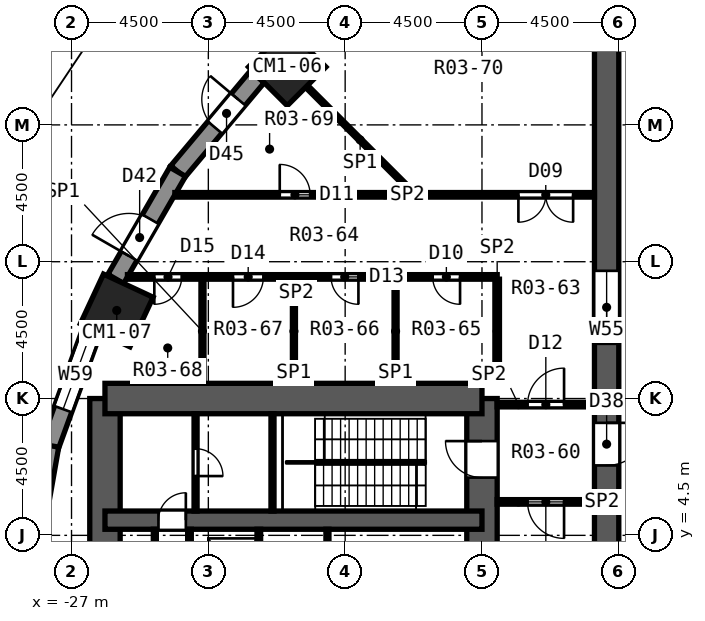
"""IFC4 building model, lengths in metres.
Left out: names, types, materials, properties, quantities, classifications, styles, units other than length and angle.
Written with IfcOpenShell. Run it as: python <this file> out.ifc"""

import sys

from ifc_helpers import new_model, si_unit, direction, frame, frame_2d, origin, origin_2d, place, context, subcontext, project, spatial, rectangle, extrude, element, fill, save


model = new_model("IFC4")
c1 = context("Model", 3, precision=1e-05, world=origin(), true_north=direction((0.0, 1.0)))
c2 = subcontext(c1, "Body", "Model", "MODEL_VIEW")
j1 = project(units=[si_unit("LENGTHUNIT", "METRE"), si_unit("PLANEANGLEUNIT", "RADIAN")], contexts=[c1])
p1 = place(None, origin())
s1 = spatial("IfcSite", under=j1, at=p1, CompositionType="ELEMENT")
p2 = place(p1, origin())
s2 = spatial("IfcBuilding", under=s1, at=p2, CompositionType="ELEMENT")
p3 = place(p2, origin())
s3 = spatial("IfcBuildingStorey", under=s2, at=p3, CompositionType="ELEMENT", Elevation=0.0)
for number, where, z_axis, x_axis in (
    (1, (-19.905, 19.905, 0.0), (0.0, 0.0, 1.0), (-0.707, 0.707, 0.0)),
    (2, (-25.512, 11.897, 0.0), (0.0, 0.0, 1.0), (-0.906, 0.423, 0.0)),
):
    element("IfcColumn", number, at=place(p3, frame(where, z_axis=z_axis, x_axis=x_axis)), inside=s3, PredefinedType="COLUMN", context=c2, shape_type="SweptSolid", body=[
        extrude(rectangle(XDim=1.8, YDim=1.8, at=origin_2d()), origin(), (0.0, 0.0, 1.0), 5.0),
    ])
p4 = place(p3, frame((-13.5, -9.0, 0.0), z_axis=(0.0, 0.0, 1.0), x_axis=(0.0, 1.0, 0.0)))
e3 = element("IfcWall", 3, at=p4, inside=s3, PredefinedType="SHEAR", context=c2, shape_type="SweptSolid", body=[
    extrude(rectangle(XDim=18.0, YDim=1.0, at=frame_2d((9.0, 0.0))), origin(), (0.0, 0.0, 1.0), 5.0),
])
p5 = place(p4, frame((15.4, 0.0, 0.0)))
e4 = element("IfcOpeningElement", 4, at=p5, cuts=e3, PredefinedType="OPENING", context=c2, shape_type="SweptSolid", body=[
    extrude(rectangle(XDim=1.2, YDim=2.1, at=frame_2d((0.6, 1.05))), frame((0.0, 0.512, 0.0), z_axis=(0.0, -1.0, 0.0), x_axis=(1.0, 0.0, 0.0)), (0.0, 0.0, 1.0), 1.024),
])
p6 = place(p4, frame((1.4, 0.0, 0.0)))
e5 = element("IfcOpeningElement", 5, at=p6, cuts=e3, PredefinedType="OPENING", context=c2, shape_type="SweptSolid", body=[
    extrude(rectangle(XDim=1.2, YDim=2.1, at=frame_2d((0.6, 1.05))), frame((0.0, 0.512, 0.0), z_axis=(0.0, -1.0, 0.0), x_axis=(1.0, 0.0, 0.0)), (0.0, 0.0, 1.0), 1.024),
])
p7 = place(p4, frame((7.5, 0.0, 0.0)))
e6 = element("IfcOpeningElement", 6, at=p7, cuts=e3, PredefinedType="OPENING", context=c2, shape_type="SweptSolid", body=[
    extrude(rectangle(XDim=3.0, YDim=2.4, at=frame_2d((1.5, 1.2))), frame((0.0, 0.512, 0.0), z_axis=(0.0, -1.0, 0.0), x_axis=(1.0, 0.0, 0.0)), (0.0, 0.0, 1.0), 1.024),
])
p8 = place(p3, frame((-25.9, -9.0, 0.0), z_axis=(0.0, 0.0, 1.0), x_axis=(0.0, 1.0, 0.0)))
e7 = element("IfcWall", 7, at=p8, inside=s3, PredefinedType="SHEAR", context=c2, shape_type="SweptSolid", body=[
    extrude(rectangle(XDim=18.0, YDim=1.0, at=frame_2d((9.0, 0.0))), origin(), (0.0, 0.0, 1.0), 5.0),
])
p9 = place(p3, frame((-13.5, 9.0, 0.0), z_axis=(0.0, 0.0, 1.0), x_axis=(-1.0, 0.0, 0.0)))
e8 = element("IfcWall", 8, at=p9, inside=s3, PredefinedType="SHEAR", context=c2, shape_type="SweptSolid", body=[
    extrude(rectangle(XDim=12.4, YDim=1.0, at=frame_2d((6.2, 0.0))), origin(), (0.0, 0.0, 1.0), 5.0),
])
p10 = place(p3, frame((-13.5, 5.0, 0.0), z_axis=(0.0, 0.0, 1.0), x_axis=(-1.0, 0.0, 0.0)))
e9 = element("IfcWall", 9, at=p10, inside=s3, PredefinedType="SHEAR", context=c2, shape_type="SweptSolid", body=[
    extrude(rectangle(XDim=12.4, YDim=0.6, at=frame_2d((6.2, 0.0))), origin(), (0.0, 0.0, 1.0), 5.0),
])
p11 = place(p10, frame((9.74, 0.0, 0.0)))
e10 = element("IfcOpeningElement", 10, at=p11, cuts=e9, PredefinedType="OPENING", context=c2, shape_type="SweptSolid", body=[
    extrude(rectangle(XDim=0.9, YDim=2.1, at=frame_2d((0.45, 1.05))), frame((0.0, 0.312, 0.0), z_axis=(0.0, -1.0, 0.0), x_axis=(1.0, 0.0, 0.0)), (0.0, 0.0, 1.0), 0.624),
])
p12 = place(p3, frame((-9.4, -27.077, 0.0), z_axis=(0.0, 0.0, 1.0), x_axis=(0.0, 1.0, 0.0)))
e11 = element("IfcWall", 11, at=p12, inside=s3, PredefinedType="SHEAR", context=c2, shape_type="SweptSolid", body=[
    extrude(rectangle(XDim=54.154, YDim=0.8, at=frame_2d((27.077, 0.0))), origin(), (0.0, 0.0, 1.0), 5.0),
])
p13 = place(p12, frame((17.377, 0.0, 0.0)))
e12 = element("IfcOpeningElement", 12, at=p13, cuts=e11, PredefinedType="OPENING", context=c2, shape_type="SweptSolid", body=[
    extrude(rectangle(XDim=1.4, YDim=2.1, at=frame_2d((0.7, 1.05))), frame((0.0, 0.412, 0.0), z_axis=(0.0, -1.0, 0.0), x_axis=(1.0, 0.0, 0.0)), (0.0, 0.0, 1.0), 0.824),
])
p14 = place(p12, frame((21.777, 0.0, 0.3)))
e13 = element("IfcOpeningElement", 13, at=p14, cuts=e11, PredefinedType="OPENING", context=c2, shape_type="SweptSolid", body=[
    extrude(rectangle(XDim=2.4, YDim=2.1, at=frame_2d((1.2, 1.05))), frame((0.0, 0.412, 0.0), z_axis=(0.0, -1.0, 0.0), x_axis=(1.0, 0.0, 0.0)), (0.0, 0.0, 1.0), 0.824),
])
p15 = place(p12, frame((24.377, 0.0, 0.0)))
e14 = element("IfcOpeningElement", 14, at=p15, cuts=e11, PredefinedType="OPENING", context=c2, shape_type="SweptSolid", body=[
    extrude(rectangle(XDim=1.4, YDim=2.1, at=frame_2d((0.7, 1.05))), frame((0.0, 0.412, 0.0), z_axis=(0.0, -1.0, 0.0), x_axis=(1.0, 0.0, 0.0)), (0.0, 0.0, 1.0), 0.824),
])
p16 = place(p12, frame((28.477, 0.0, 0.3)))
e15 = element("IfcOpeningElement", 15, at=p16, cuts=e11, PredefinedType="OPENING", context=c2, shape_type="SweptSolid", body=[
    extrude(rectangle(XDim=2.4, YDim=2.1, at=frame_2d((1.2, 1.05))), frame((0.0, 0.412, 0.0), z_axis=(0.0, -1.0, 0.0), x_axis=(1.0, 0.0, 0.0)), (0.0, 0.0, 1.0), 0.824),
])
p17 = place(p12, frame((33.877, 0.0, 0.0)))
e16 = element("IfcOpeningElement", 16, at=p17, cuts=e11, PredefinedType="OPENING", context=c2, shape_type="SweptSolid", body=[
    extrude(rectangle(XDim=1.4, YDim=2.1, at=frame_2d((0.7, 1.05))), frame((0.0, 0.412, 0.0), z_axis=(0.0, -1.0, 0.0), x_axis=(1.0, 0.0, 0.0)), (0.0, 0.0, 1.0), 0.824),
])
p18 = place(p12, frame((37.877, 0.0, 0.3)))
e17 = element("IfcOpeningElement", 17, at=p18, cuts=e11, PredefinedType="OPENING", context=c2, shape_type="SweptSolid", body=[
    extrude(rectangle(XDim=2.4, YDim=2.1, at=frame_2d((1.2, 1.05))), frame((0.0, 0.412, 0.0), z_axis=(0.0, -1.0, 0.0), x_axis=(1.0, 0.0, 0.0)), (0.0, 0.0, 1.0), 0.824),
])
p19 = place(p3, frame((-20.891, 19.581, 0.0), z_axis=(0.0, 0.0, 1.0), x_axis=(-0.642800844336, -0.766033337734, 0.0)))
e18 = element("IfcWall", 18, at=p19, inside=s3, PredefinedType="SOLIDWALL", context=c2, shape_type="SweptSolid", body=[
    extrude(rectangle(XDim=4.069, YDim=0.6, at=frame_2d((2.035, 0.0))), origin(), (0.0, 0.0, 1.0), 4.45),
])
p20 = place(p19, frame((0.972, 0.0, 0.0)))
e19 = element("IfcOpeningElement", 19, at=p20, cuts=e18, PredefinedType="OPENING", context=c2, shape_type="SweptSolid", body=[
    extrude(rectangle(XDim=1.2, YDim=2.1, at=frame_2d((0.6, 1.05))), frame((0.0, 0.312, 0.0), z_axis=(0.0, -1.0, 0.0), x_axis=(1.0, 0.0, 0.0)), (0.0, 0.0, 1.0), 0.624),
])
p21 = place(p3, frame((-23.51, 16.458, 0.0), z_axis=(0.0, 0.0, 1.0), x_axis=(-0.500023678693, -0.866011732453, 0.0)))
e20 = element("IfcWall", 20, at=p21, inside=s3, PredefinedType="SOLIDWALL", context=c2, shape_type="SweptSolid", body=[
    extrude(rectangle(XDim=4.069, YDim=0.6, at=frame_2d((2.035, 0.0))), origin(), (0.0, 0.0, 1.0), 4.45),
])
p22 = place(p21, frame((1.798, 0.0, 0.0)))
e21 = element("IfcOpeningElement", 21, at=p22, cuts=e20, PredefinedType="OPENING", context=c2, shape_type="SweptSolid", body=[
    extrude(rectangle(XDim=1.4, YDim=2.1, at=frame_2d((0.7, 1.05))), frame((0.0, 0.312, 0.0), z_axis=(0.0, -1.0, 0.0), x_axis=(1.0, 0.0, 0.0)), (0.0, 0.0, 1.0), 0.624),
])
p23 = place(p3, frame((-26.328, 11.255, 0.0), z_axis=(0.0, 0.0, 1.0), x_axis=(-0.342034744565, -0.939687306241, 0.0)))
e22 = element("IfcWall", 22, at=p23, inside=s3, PredefinedType="SOLIDWALL", context=c2, shape_type="SweptSolid", body=[
    extrude(rectangle(XDim=4.099, YDim=0.6, at=frame_2d((2.05, 0.0))), origin(), (0.0, 0.0, 1.0), 4.45),
])
p24 = place(p23, frame((0.372, 0.0, 0.3)))
e23 = element("IfcOpeningElement", 23, at=p24, cuts=e22, PredefinedType="OPENING", context=c2, shape_type="SweptSolid", body=[
    extrude(rectangle(XDim=2.4, YDim=2.1, at=frame_2d((1.2, 1.05))), frame((0.0, 0.312, 0.0), z_axis=(0.0, -1.0, 0.0), x_axis=(1.0, 0.0, 0.0)), (0.0, 0.0, 1.0), 0.624),
])
p25 = place(p3, frame((-27.716, 7.454, 0.0), z_axis=(0.0, 0.0, 1.0), x_axis=(-0.173673210505, -0.984803338719, 0.0)))
e24 = element("IfcWall", 24, at=p25, inside=s3, PredefinedType="SOLIDWALL", context=c2, shape_type="SweptSolid", body=[
    extrude(rectangle(XDim=4.099, YDim=0.6, at=frame_2d((2.05, 0.0))), origin(), (0.0, 0.0, 1.0), 4.45),
])
p26 = place(p3, frame((-19.262, 19.262, 0.0), z_axis=(0.0, 0.0, 1.0), x_axis=(0.707180580359, -0.707032974311, 0.0)))
e25 = element("IfcWall", 25, at=p26, inside=s3, PredefinedType="PARTITIONING", context=c2, shape_type="SweptSolid", body=[
    extrude(rectangle(XDim=4.962, YDim=0.1, at=frame_2d((2.481, 0.0))), origin(), (0.0, 0.0, 1.0), 4.45),
])
p27 = place(p3, frame((-13.0, 5.6, 0.0), z_axis=(0.0, 0.0, 1.0), x_axis=(1.0, 0.0, 0.0)))
e26 = element("IfcWall", 26, at=p27, inside=s3, PredefinedType="PARTITIONING", context=c2, shape_type="SweptSolid", body=[
    extrude(rectangle(XDim=3.2, YDim=0.15, at=frame_2d((1.6, 0.0))), origin(), (0.0, 0.0, 1.0), 4.45),
])
p28 = place(p27, frame((1.0, 0.0, 0.0)))
e27 = element("IfcOpeningElement", 27, at=p28, cuts=e26, PredefinedType="OPENING", context=c2, shape_type="SweptSolid", body=[
    extrude(rectangle(XDim=1.2, YDim=2.1, at=frame_2d((0.6, 1.05))), frame((0.0, 0.087, 0.0), z_axis=(0.0, -1.0, 0.0), x_axis=(1.0, 0.0, 0.0)), (0.0, 0.0, 1.0), 0.174),
])
p29 = place(p3, frame((-13.0, 8.8, 0.0), z_axis=(0.0, 0.0, 1.0), x_axis=(1.0, 0.0, 0.0)))
e28 = element("IfcWall", 28, at=p29, inside=s3, PredefinedType="PARTITIONING", context=c2, shape_type="SweptSolid", body=[
    extrude(rectangle(XDim=3.2, YDim=0.15, at=frame_2d((1.6, 0.0))), origin(), (0.0, 0.0, 1.0), 4.45),
])
p30 = place(p29, frame((1.0, 0.0, 0.0)))
e29 = element("IfcOpeningElement", 29, at=p30, cuts=e28, PredefinedType="OPENING", context=c2, shape_type="SweptSolid", body=[
    extrude(rectangle(XDim=1.2, YDim=2.1, at=frame_2d((0.6, 1.05))), frame((0.0, 0.087, 0.0), z_axis=(0.0, -1.0, 0.0), x_axis=(1.0, 0.0, 0.0)), (0.0, 0.0, 1.0), 0.174),
])
p31 = place(p3, frame((-25.16, 13.0, 0.0), z_axis=(0.0, 0.0, 1.0), x_axis=(1.0, 0.0, 0.0)))
e30 = element("IfcWall", 30, at=p31, inside=s3, PredefinedType="PARTITIONING", context=c2, shape_type="SweptSolid", body=[
    extrude(rectangle(XDim=12.16, YDim=0.15, at=frame_2d((6.08, 0.0))), origin(), (0.0, 0.0, 1.0), 4.45),
])
p32 = place(p31, frame((10.039, 0.0, 0.0)))
e31 = element("IfcOpeningElement", 31, at=p32, cuts=e30, PredefinedType="OPENING", context=c2, shape_type="SweptSolid", body=[
    extrude(rectangle(XDim=0.9, YDim=2.1, at=frame_2d((0.45, 1.05))), frame((0.0, 0.087, 0.0), z_axis=(0.0, -1.0, 0.0), x_axis=(1.0, 0.0, 0.0)), (0.0, 0.0, 1.0), 0.174),
])
p33 = place(p31, frame((6.697, 0.0, 0.0)))
e32 = element("IfcOpeningElement", 32, at=p33, cuts=e30, PredefinedType="OPENING", context=c2, shape_type="SweptSolid", body=[
    extrude(rectangle(XDim=0.9, YDim=2.1, at=frame_2d((0.45, 1.05))), frame((0.0, 0.087, 0.0), z_axis=(0.0, -1.0, 0.0), x_axis=(1.0, 0.0, 0.0)), (0.0, 0.0, 1.0), 0.174),
])
p34 = place(p31, frame((3.471, 0.0, 0.0)))
e33 = element("IfcOpeningElement", 33, at=p34, cuts=e30, PredefinedType="OPENING", context=c2, shape_type="SweptSolid", body=[
    extrude(rectangle(XDim=1.0, YDim=2.1, at=frame_2d((0.5, 1.05))), frame((0.0, 0.087, 0.0), z_axis=(0.0, -1.0, 0.0), x_axis=(1.0, 0.0, 0.0)), (0.0, 0.0, 1.0), 0.174),
])
p35 = place(p31, frame((0.884, 0.0, 0.0)))
e34 = element("IfcOpeningElement", 34, at=p35, cuts=e30, PredefinedType="OPENING", context=c2, shape_type="SweptSolid", body=[
    extrude(rectangle(XDim=0.9, YDim=2.1, at=frame_2d((0.45, 1.05))), frame((0.0, 0.087, 0.0), z_axis=(0.0, -1.0, 0.0), x_axis=(1.0, 0.0, 0.0)), (0.0, 0.0, 1.0), 0.174),
])
p36 = place(p3, frame((-23.601, 15.7, 0.0), z_axis=(0.0, 0.0, 1.0), x_axis=(1.0, 0.0, 0.0)))
e35 = element("IfcWall", 35, at=p36, inside=s3, PredefinedType="PARTITIONING", context=c2, shape_type="SweptSolid", body=[
    extrude(rectangle(XDim=13.801, YDim=0.15, at=frame_2d((6.9, 0.0))), origin(), (0.0, 0.0, 1.0), 4.45),
])
p37 = place(p36, frame((11.299, 0.0, 0.0)))
e36 = element("IfcOpeningElement", 36, at=p37, cuts=e35, PredefinedType="OPENING", context=c2, shape_type="SweptSolid", body=[
    extrude(rectangle(XDim=1.8, YDim=2.1, at=frame_2d((0.9, 1.05))), frame((0.0, 0.087, 0.0), z_axis=(0.0, -1.0, 0.0), x_axis=(1.0, 0.0, 0.0)), (0.0, 0.0, 1.0), 0.174),
])
p38 = place(p36, frame((3.449, 0.0, 0.0)))
e37 = element("IfcOpeningElement", 37, at=p38, cuts=e35, PredefinedType="OPENING", context=c2, shape_type="SweptSolid", body=[
    extrude(rectangle(XDim=1.0, YDim=2.1, at=frame_2d((0.5, 1.05))), frame((0.0, 0.087, 0.0), z_axis=(0.0, -1.0, 0.0), x_axis=(1.0, 0.0, 0.0)), (0.0, 0.0, 1.0), 0.174),
])
p39 = place(p3, frame((-13.0, 9.5, 0.0), z_axis=(0.0, 0.0, 1.0), x_axis=(0.0, 1.0, 0.0)))
e38 = element("IfcWall", 38, at=p39, inside=s3, PredefinedType="PARTITIONING", context=c2, shape_type="SweptSolid", body=[
    extrude(rectangle(XDim=3.425, YDim=0.15, at=frame_2d((1.712, 0.0))), origin(), (0.0, 0.0, 1.0), 4.45),
])
for number, where, z_axis, x_axis in (
    (39, (-16.342, 9.5, 0.0), (0.0, 0.0, 1.0), (0.0, 1.0, 0.0)),
    (40, (-19.685, 9.5, 0.0), (0.0, 0.0, 1.0), (0.0, 1.0, 0.0)),
    (41, (-22.693, 9.5, 0.0), (0.0, 0.0, 1.0), (0.0, 1.0, 0.0)),
):
    element("IfcWall", number, at=place(p3, frame(where, z_axis=z_axis, x_axis=x_axis)), inside=s3, PredefinedType="PARTITIONING", context=c2, shape_type="SweptSolid", body=[
        extrude(rectangle(XDim=3.425, YDim=0.1, at=frame_2d((1.712, 0.0))), origin(), (0.0, 0.0, 1.0), 4.45),
    ])
p40 = place(p3, frame((-18.583, 2.3, 0.0), z_axis=(0.0, 0.0, 1.0), x_axis=(0.0, 1.0, 0.0)))
e42 = element("IfcWall", 42, at=p40, inside=s3, PredefinedType="PARTITIONING", context=c2, shape_type="SweptSolid", body=[
    extrude(rectangle(XDim=2.4, YDim=0.1, at=frame_2d((1.2, 0.0))), origin(), (0.0, 0.0, 1.0), 4.45),
])
for number, where, z_axis, x_axis in (
    (43, (-20.84, 2.3, 0.0), (0.0, 0.0, 1.0), (0.0, 1.0, 0.0)),
    (44, (-23.12, 2.3, 0.0), (0.0, 0.0, 1.0), (0.0, 1.0, 0.0)),
):
    element("IfcWall", number, at=place(p3, frame(where, z_axis=z_axis, x_axis=x_axis)), inside=s3, PredefinedType="PARTITIONING", context=c2, shape_type="SweptSolid", body=[
        extrude(rectangle(XDim=2.4, YDim=0.12, at=frame_2d((1.2, 0.0))), origin(), (0.0, 0.0, 1.0), 4.45),
    ])
p41 = place(p3, frame((-24.26, 2.3, 0.0), z_axis=(0.0, 0.0, 1.0), x_axis=(0.0, 1.0, 0.0)))
e45 = element("IfcWall", 45, at=p41, inside=s3, PredefinedType="PARTITIONING", context=c2, shape_type="SweptSolid", body=[
    extrude(rectangle(XDim=2.4, YDim=0.1, at=frame_2d((1.2, 0.0))), origin(), (0.0, 0.0, 1.0), 4.45),
])
p42 = place(p3, frame((-20.39, 5.3, 0.0), z_axis=(0.0, 0.0, 1.0), x_axis=(0.0, 1.0, 0.0)))
e46 = element("IfcWall", 46, at=p42, inside=s3, PredefinedType="PARTITIONING", context=c2, shape_type="SweptSolid", body=[
    extrude(rectangle(XDim=3.2, YDim=0.1, at=frame_2d((1.6, 0.0))), origin(), (0.0, 0.0, 1.0), 4.45),
])
p43 = place(p3, frame((-22.92, 5.3, 0.0), z_axis=(0.0, 0.0, 1.0), x_axis=(0.0, 1.0, 0.0)))
e47 = element("IfcWall", 47, at=p43, inside=s3, PredefinedType="PARTITIONING", context=c2, shape_type="SweptSolid", body=[
    extrude(rectangle(XDim=3.2, YDim=0.1, at=frame_2d((1.6, 0.0))), origin(), (0.0, 0.0, 1.0), 4.45),
])
p44 = place(p43, frame((1.15, 0.0, 0.0)))
e48 = element("IfcOpeningElement", 48, at=p44, cuts=e47, PredefinedType="OPENING", context=c2, shape_type="SweptSolid", body=[
    extrude(rectangle(XDim=0.9, YDim=2.1, at=frame_2d((0.45, 1.05))), frame((0.0, 0.062, 0.0), z_axis=(0.0, -1.0, 0.0), x_axis=(1.0, 0.0, 0.0)), (0.0, 0.0, 1.0), 0.124),
])
p45 = place(p37, frame((1.8, 0.0, 0.0), z_axis=(0.0, 0.0, 1.0), x_axis=(-1.0, 0.0, 0.0)))
e49 = element("IfcDoor", 49, at=p45, inside=s3, OperationType="DOUBLE_DOOR_SINGLE_SWING", PredefinedType="DOOR", context=c2, shape_type="SweptSolid", body=[
    extrude(rectangle(XDim=1.8, YDim=2.1, at=frame_2d((0.9, 1.05))), frame((0.0, 0.025, 0.0), z_axis=(0.0, -1.0, 0.0), x_axis=(1.0, 0.0, 0.0)), (0.0, 0.0, 1.0), 0.05),
])
fill(e36, e49)
p46 = place(p32, frame((0.9, 0.0, 0.0), z_axis=(0.0, 0.0, 1.0), x_axis=(-1.0, 0.0, 0.0)))
e50 = element("IfcDoor", 50, at=p46, inside=s3, OperationType="SINGLE_SWING_LEFT", PredefinedType="DOOR", context=c2, shape_type="SweptSolid", body=[
    extrude(rectangle(XDim=0.9, YDim=2.1, at=frame_2d((0.45, 1.05))), frame((0.0, 0.025, 0.0), z_axis=(0.0, -1.0, 0.0), x_axis=(1.0, 0.0, 0.0)), (0.0, 0.0, 1.0), 0.05),
])
fill(e31, e50)
p47 = place(p38, origin())
e51 = element("IfcDoor", 51, at=p47, inside=s3, OperationType="SINGLE_SWING_LEFT", PredefinedType="DOOR", context=c2, shape_type="SweptSolid", body=[
    extrude(rectangle(XDim=1.0, YDim=2.1, at=frame_2d((0.5, 1.05))), frame((0.0, 0.025, 0.0), z_axis=(0.0, -1.0, 0.0), x_axis=(1.0, 0.0, 0.0)), (0.0, 0.0, 1.0), 0.05),
])
fill(e37, e51)
p48 = place(p30, origin())
e52 = element("IfcDoor", 52, at=p48, inside=s3, OperationType="SINGLE_SWING_RIGHT", PredefinedType="DOOR", context=c2, shape_type="SweptSolid", body=[
    extrude(rectangle(XDim=1.2, YDim=2.1, at=frame_2d((0.6, 1.05))), frame((0.0, 0.025, 0.0), z_axis=(0.0, -1.0, 0.0), x_axis=(1.0, 0.0, 0.0)), (0.0, 0.0, 1.0), 0.05),
])
fill(e29, e52)
p49 = place(p33, frame((0.9, 0.0, 0.0), z_axis=(0.0, 0.0, 1.0), x_axis=(-1.0, 0.0, 0.0)))
e53 = element("IfcDoor", 53, at=p49, inside=s3, OperationType="SINGLE_SWING_LEFT", PredefinedType="DOOR", context=c2, shape_type="SweptSolid", body=[
    extrude(rectangle(XDim=0.9, YDim=2.1, at=frame_2d((0.45, 1.05))), frame((0.0, 0.025, 0.0), z_axis=(0.0, -1.0, 0.0), x_axis=(1.0, 0.0, 0.0)), (0.0, 0.0, 1.0), 0.05),
])
fill(e32, e53)
p50 = place(p34, frame((1.0, 0.0, 0.0), z_axis=(0.0, 0.0, 1.0), x_axis=(-1.0, 0.0, 0.0)))
e54 = element("IfcDoor", 54, at=p50, inside=s3, OperationType="SINGLE_SWING_RIGHT", PredefinedType="DOOR", context=c2, shape_type="SweptSolid", body=[
    extrude(rectangle(XDim=1.0, YDim=2.1, at=frame_2d((0.5, 1.05))), frame((0.0, 0.025, 0.0), z_axis=(0.0, -1.0, 0.0), x_axis=(1.0, 0.0, 0.0)), (0.0, 0.0, 1.0), 0.05),
])
fill(e33, e54)
p51 = place(p35, frame((0.9, 0.0, 0.0), z_axis=(0.0, 0.0, 1.0), x_axis=(-1.0, 0.0, 0.0)))
e55 = element("IfcDoor", 55, at=p51, inside=s3, OperationType="SINGLE_SWING_RIGHT", PredefinedType="DOOR", context=c2, shape_type="SweptSolid", body=[
    extrude(rectangle(XDim=0.9, YDim=2.1, at=frame_2d((0.45, 1.05))), frame((0.0, 0.025, 0.0), z_axis=(0.0, -1.0, 0.0), x_axis=(1.0, 0.0, 0.0)), (0.0, 0.0, 1.0), 0.05),
])
fill(e34, e55)
p52 = place(p28, frame((1.2, 0.0, 0.0), z_axis=(0.0, 0.0, 1.0), x_axis=(-1.0, 0.0, 0.0)))
e56 = element("IfcDoor", 56, at=p52, inside=s3, OperationType="SINGLE_SWING_LEFT", PredefinedType="DOOR", context=c2, shape_type="SweptSolid", body=[
    extrude(rectangle(XDim=1.2, YDim=2.1, at=frame_2d((0.6, 1.05))), frame((0.0, 0.025, 0.0), z_axis=(0.0, -1.0, 0.0), x_axis=(1.0, 0.0, 0.0)), (0.0, 0.0, 1.0), 0.05),
])
fill(e27, e56)
p53 = place(p17, frame((1.4, 0.0, 0.0), z_axis=(0.0, 0.0, 1.0), x_axis=(-1.0, 0.0, 0.0)))
e57 = element("IfcDoor", 57, at=p53, inside=s3, OperationType="SINGLE_SWING_LEFT", PredefinedType="DOOR", context=c2, shape_type="SweptSolid", body=[
    extrude(rectangle(XDim=1.4, YDim=2.1, at=frame_2d((0.7, 1.05))), frame((0.0, 0.025, 0.0), z_axis=(0.0, -1.0, 0.0), x_axis=(1.0, 0.0, 0.0)), (0.0, 0.0, 1.0), 0.05),
])
fill(e16, e57)
p54 = place(p18, origin())
e58 = element("IfcWindow", 58, at=p54, inside=s3, PartitioningType="SINGLE_PANEL", PredefinedType="WINDOW", context=c2, shape_type="SweptSolid", body=[
    extrude(rectangle(XDim=2.4, YDim=2.1, at=frame_2d((1.2, 1.05))), frame((0.0, 0.03, 0.0), z_axis=(0.0, -1.0, 0.0), x_axis=(1.0, 0.0, 0.0)), (0.0, 0.0, 1.0), 0.06),
])
fill(e17, e58)
p55 = place(p22, frame((1.4, 0.0, 0.0), z_axis=(0.0, 0.0, 1.0), x_axis=(-1.0, 0.0, 0.0)))
e59 = element("IfcDoor", 59, at=p55, inside=s3, OperationType="SINGLE_SWING_LEFT", PredefinedType="DOOR", context=c2, shape_type="SweptSolid", body=[
    extrude(rectangle(XDim=1.4, YDim=2.1, at=frame_2d((0.7, 1.05))), frame((0.0, 0.025, 0.0), z_axis=(0.0, -1.0, 0.0), x_axis=(1.0, 0.0, 0.0)), (0.0, 0.0, 1.0), 0.05),
])
fill(e21, e59)
p56 = place(p20, frame((1.2, 0.0, 0.0), z_axis=(0.0, 0.0, 1.0), x_axis=(-1.0, 0.0, 0.0)))
e60 = element("IfcDoor", 60, at=p56, inside=s3, OperationType="SINGLE_SWING_RIGHT", PredefinedType="DOOR", context=c2, shape_type="SweptSolid", body=[
    extrude(rectangle(XDim=1.2, YDim=2.1, at=frame_2d((0.6, 1.05))), frame((0.0, 0.025, 0.0), z_axis=(0.0, -1.0, 0.0), x_axis=(1.0, 0.0, 0.0)), (0.0, 0.0, 1.0), 0.05),
])
fill(e19, e60)
p57 = place(p24, origin())
e61 = element("IfcWindow", 61, at=p57, inside=s3, PartitioningType="SINGLE_PANEL", PredefinedType="WINDOW", context=c2, shape_type="SweptSolid", body=[
    extrude(rectangle(XDim=2.4, YDim=2.1, at=frame_2d((1.2, 1.05))), frame((0.0, 0.03, 0.0), z_axis=(0.0, -1.0, 0.0), x_axis=(1.0, 0.0, 0.0)), (0.0, 0.0, 1.0), 0.06),
])
fill(e23, e61)
p58 = place(p44, frame((0.9, 0.0, 0.0), z_axis=(0.0, 0.0, 1.0), x_axis=(-1.0, 0.0, 0.0)))
e62 = element("IfcDoor", 62, at=p58, inside=s3, OperationType="SINGLE_SWING_RIGHT", PredefinedType="DOOR", context=c2, shape_type="SweptSolid", body=[
    extrude(rectangle(XDim=0.9, YDim=2.1, at=frame_2d((0.45, 1.05))), frame((0.0, 0.025, 0.0), z_axis=(0.0, -1.0, 0.0), x_axis=(1.0, 0.0, 0.0)), (0.0, 0.0, 1.0), 0.05),
])
fill(e48, e62)
p59 = place(p11, frame((0.9, 0.0, 0.0), z_axis=(0.0, 0.0, 1.0), x_axis=(-1.0, 0.0, 0.0)))
e63 = element("IfcDoor", 63, at=p59, inside=s3, OperationType="SINGLE_SWING_RIGHT", PredefinedType="DOOR", context=c2, shape_type="SweptSolid", body=[
    extrude(rectangle(XDim=0.9, YDim=2.1, at=frame_2d((0.45, 1.05))), frame((0.0, 0.025, 0.0), z_axis=(0.0, -1.0, 0.0), x_axis=(1.0, 0.0, 0.0)), (0.0, 0.0, 1.0), 0.05),
])
fill(e10, e63)
p60 = place(p5, origin())
e64 = element("IfcDoor", 64, at=p60, inside=s3, OperationType="SINGLE_SWING_RIGHT", PredefinedType="DOOR", context=c2, shape_type="SweptSolid", body=[
    extrude(rectangle(XDim=1.2, YDim=2.1, at=frame_2d((0.6, 1.05))), frame((0.0, 0.025, 0.0), z_axis=(0.0, -1.0, 0.0), x_axis=(1.0, 0.0, 0.0)), (0.0, 0.0, 1.0), 0.05),
])
fill(e4, e64)
save(model, sys.argv[1])
